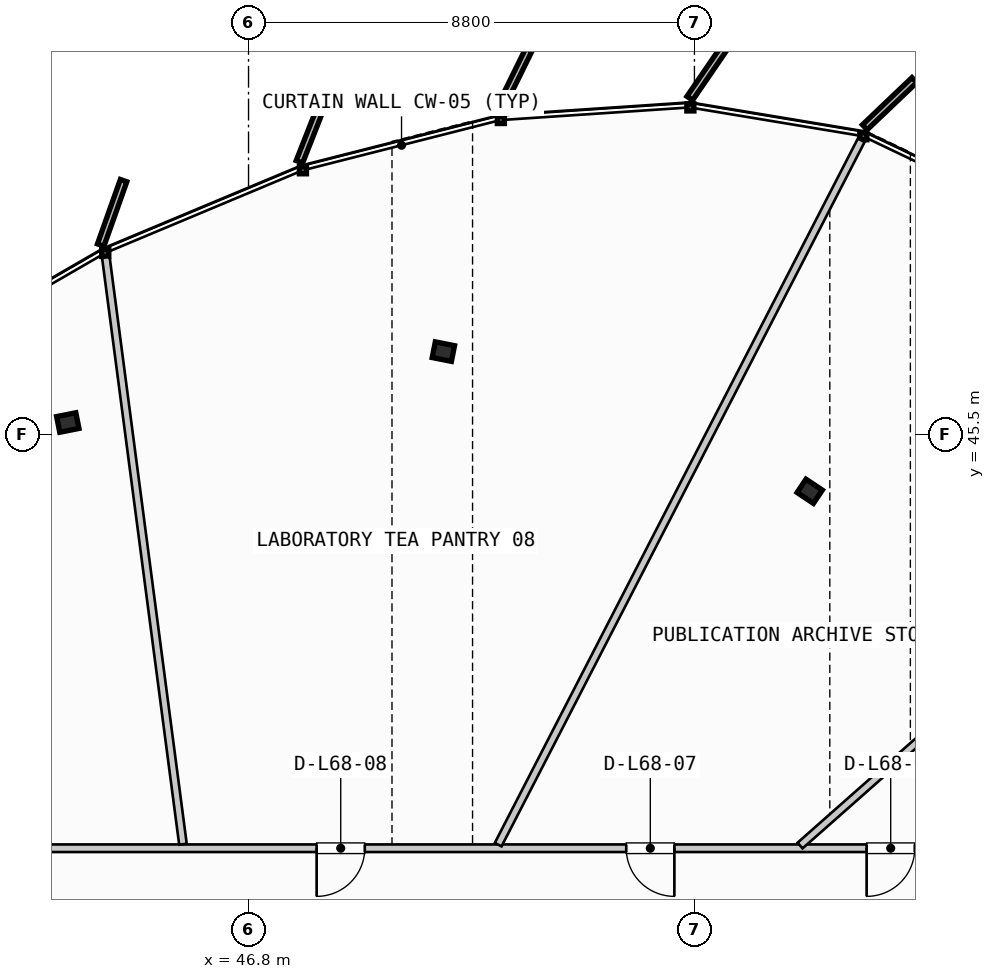
"""IFC4 building model, lengths in metres.
Left out: names, types, materials, properties, quantities, classifications, styles, units other than length and angle.
Written with IfcOpenShell. Run it as: python <this file> out.ifc"""

import sys

from ifc_helpers import new_model, si_unit, direction, frame, frame_2d, origin, origin_2d, place, context, subcontext, project, spatial, rectangle, i_section, extrude, source, transform, mapped, element, fill, save


model = new_model("IFC4")
c1 = context("Model", 3, precision=1e-05, world=origin(), true_north=direction((0.0, 1.0)))
c2 = subcontext(c1, "Body", "Model", "MODEL_VIEW")
j1 = project(units=[si_unit("LENGTHUNIT", "METRE"), si_unit("PLANEANGLEUNIT", "RADIAN")], contexts=[c1])
p1 = place(None, origin())
s1 = spatial("IfcSite", under=j1, at=p1, CompositionType="ELEMENT")
p2 = place(p1, origin())
s2 = spatial("IfcBuilding", under=s1, at=p2, CompositionType="ELEMENT")
p3 = place(p2, frame((0.0, 0.0, 259.45)))
s3 = spatial("IfcBuildingStorey", under=s2, at=p3, CompositionType="ELEMENT", Elevation=259.45)
m1 = source(origin(), c2, "Body", "SweptSolid", [
    extrude(i_section(OverallWidth=0.387, OverallDepth=0.316, WebThickness=0.019, FlangeThickness=0.028, FilletRadius=0.015, at=origin_2d()), origin(), (0.0, 0.0, 1.0), 3.21),
])
for number, where, z_axis, x_axis in (
    (1, (57.875, 44.375, 0.0), (0.0, 0.0, 1.0), (0.556, 0.831, 0.0)),
    (2, (50.645, 47.132, 0.0), (0.0, 0.0, 1.0), (0.195, 0.981, 0.0)),
    (3, (43.233, 45.732, 0.0), (0.0, 0.0, 1.0), (-0.195, 0.981, 0.0)),
):
    element("IfcColumn", number, at=place(p3, frame(where, z_axis=z_axis, x_axis=x_axis)), inside=s3, PredefinedType="COLUMN", context=c2, shape_type="MappedRepresentation", body=[
        mapped(m1, transform((0.0, 0.0, 0.0), scale=1.0)),
    ])
p4 = place(p3, frame((61.902, 37.331, 0.0), z_axis=(0.0, 0.0, 1.0), x_axis=(-1.0, 0.0, 0.0)))
e4 = element("IfcWall", 4, at=p4, inside=s3, PredefinedType="PARTITIONING", context=c2, shape_type="SweptSolid", body=[
    extrude(rectangle(XDim=29.442, YDim=0.15, at=frame_2d((14.721, 0.0))), origin(), (0.0, 0.0, 1.0), 2.735),
])
p5 = place(p4, frame((1.954, 0.0, 0.0)))
e5 = element("IfcOpeningElement", 5, at=p5, cuts=e4, PredefinedType="OPENING", context=c2, shape_type="SweptSolid", body=[
    extrude(rectangle(XDim=0.95, YDim=2.15, at=frame_2d((0.475, 1.075))), frame((0.0, 0.085, 0.0), z_axis=(0.0, -1.0, 0.0), x_axis=(1.0, 0.0, 0.0)), (0.0, 0.0, 1.0), 0.17),
])
p6 = place(p4, frame((6.698, 0.0, 0.0)))
e6 = element("IfcOpeningElement", 6, at=p6, cuts=e4, PredefinedType="OPENING", context=c2, shape_type="SweptSolid", body=[
    extrude(rectangle(XDim=0.95, YDim=2.15, at=frame_2d((0.475, 1.075))), frame((0.0, 0.085, 0.0), z_axis=(0.0, -1.0, 0.0), x_axis=(1.0, 0.0, 0.0)), (0.0, 0.0, 1.0), 0.17),
])
p7 = place(p4, frame((12.808, 0.0, 0.0)))
e7 = element("IfcOpeningElement", 7, at=p7, cuts=e4, PredefinedType="OPENING", context=c2, shape_type="SweptSolid", body=[
    extrude(rectangle(XDim=0.95, YDim=2.15, at=frame_2d((0.475, 1.075))), frame((0.0, 0.085, 0.0), z_axis=(0.0, -1.0, 0.0), x_axis=(1.0, 0.0, 0.0)), (0.0, 0.0, 1.0), 0.17),
])
p8 = place(p4, frame((22.149, 0.0, 0.0)))
e8 = element("IfcOpeningElement", 8, at=p8, cuts=e4, PredefinedType="OPENING", context=c2, shape_type="SweptSolid", body=[
    extrude(rectangle(XDim=0.95, YDim=2.15, at=frame_2d((0.475, 1.075))), frame((0.0, 0.085, 0.0), z_axis=(0.0, -1.0, 0.0), x_axis=(1.0, 0.0, 0.0)), (0.0, 0.0, 1.0), 0.17),
])
p9 = place(p3, frame((57.685, 37.384, 0.0), z_axis=(0.0, 0.0, 1.0), x_axis=(0.749480137602, 0.662026829774, 0.0)))
e9 = element("IfcWall", 9, at=p9, inside=s3, PredefinedType="PARTITIONING", context=c2, shape_type="SweptSolid", body=[
    extrude(rectangle(XDim=11.077, YDim=0.15, at=frame_2d((5.539, 0.0))), origin(), (0.0, 0.0, 1.0), 2.735),
])
p10 = place(p3, frame((51.727, 37.402, 0.0), z_axis=(0.0, 0.0, 1.0), x_axis=(0.458208193746, 0.888844897147, 0.0)))
e10 = element("IfcWall", 10, at=p10, inside=s3, PredefinedType="PARTITIONING", context=c2, shape_type="SweptSolid", body=[
    extrude(rectangle(XDim=15.638, YDim=0.15, at=frame_2d((7.819, 0.0))), origin(), (0.0, 0.0, 1.0), 2.735),
])
p11 = place(p3, frame((45.506, 37.41, 0.0), z_axis=(0.0, 0.0, 1.0), x_axis=(-0.130305253758, 0.991473923431, 0.0)))
e11 = element("IfcWall", 11, at=p11, inside=s3, PredefinedType="PARTITIONING", context=c2, shape_type="SweptSolid", body=[
    extrude(rectangle(XDim=11.678, YDim=0.15, at=frame_2d((5.839, 0.0))), origin(), (0.0, 0.0, 1.0), 2.735),
])
m2 = source(origin(), c2, "Body", "SweptSolid", [
    extrude(rectangle(XDim=0.95, YDim=2.15, at=frame_2d((0.475, 1.075))), frame((0.0, 0.025, 0.0), z_axis=(0.0, -1.0, 0.0), x_axis=(1.0, 0.0, 0.0)), (0.0, 0.0, 1.0), 0.05),
])
p12 = place(p5, origin())
e12 = element("IfcDoor", 12, at=p12, inside=s3, OperationType="SINGLE_SWING_RIGHT", PredefinedType="DOOR", context=c2, shape_type="MappedRepresentation", body=[
    mapped(m2, transform((0.0, 0.0, 0.0), scale=1.0)),
])
fill(e5, e12)
p13 = place(p6, origin())
e13 = element("IfcDoor", 13, at=p13, inside=s3, OperationType="SINGLE_SWING_LEFT", PredefinedType="DOOR", context=c2, shape_type="MappedRepresentation", body=[
    mapped(m2, transform((0.0, 0.0, 0.0), scale=1.0)),
])
fill(e6, e13)
p14 = place(p7, origin())
e14 = element("IfcDoor", 14, at=p14, inside=s3, OperationType="SINGLE_SWING_RIGHT", PredefinedType="DOOR", context=c2, shape_type="MappedRepresentation", body=[
    mapped(m2, transform((0.0, 0.0, 0.0), scale=1.0)),
])
fill(e7, e14)
save(model, sys.argv[1])
